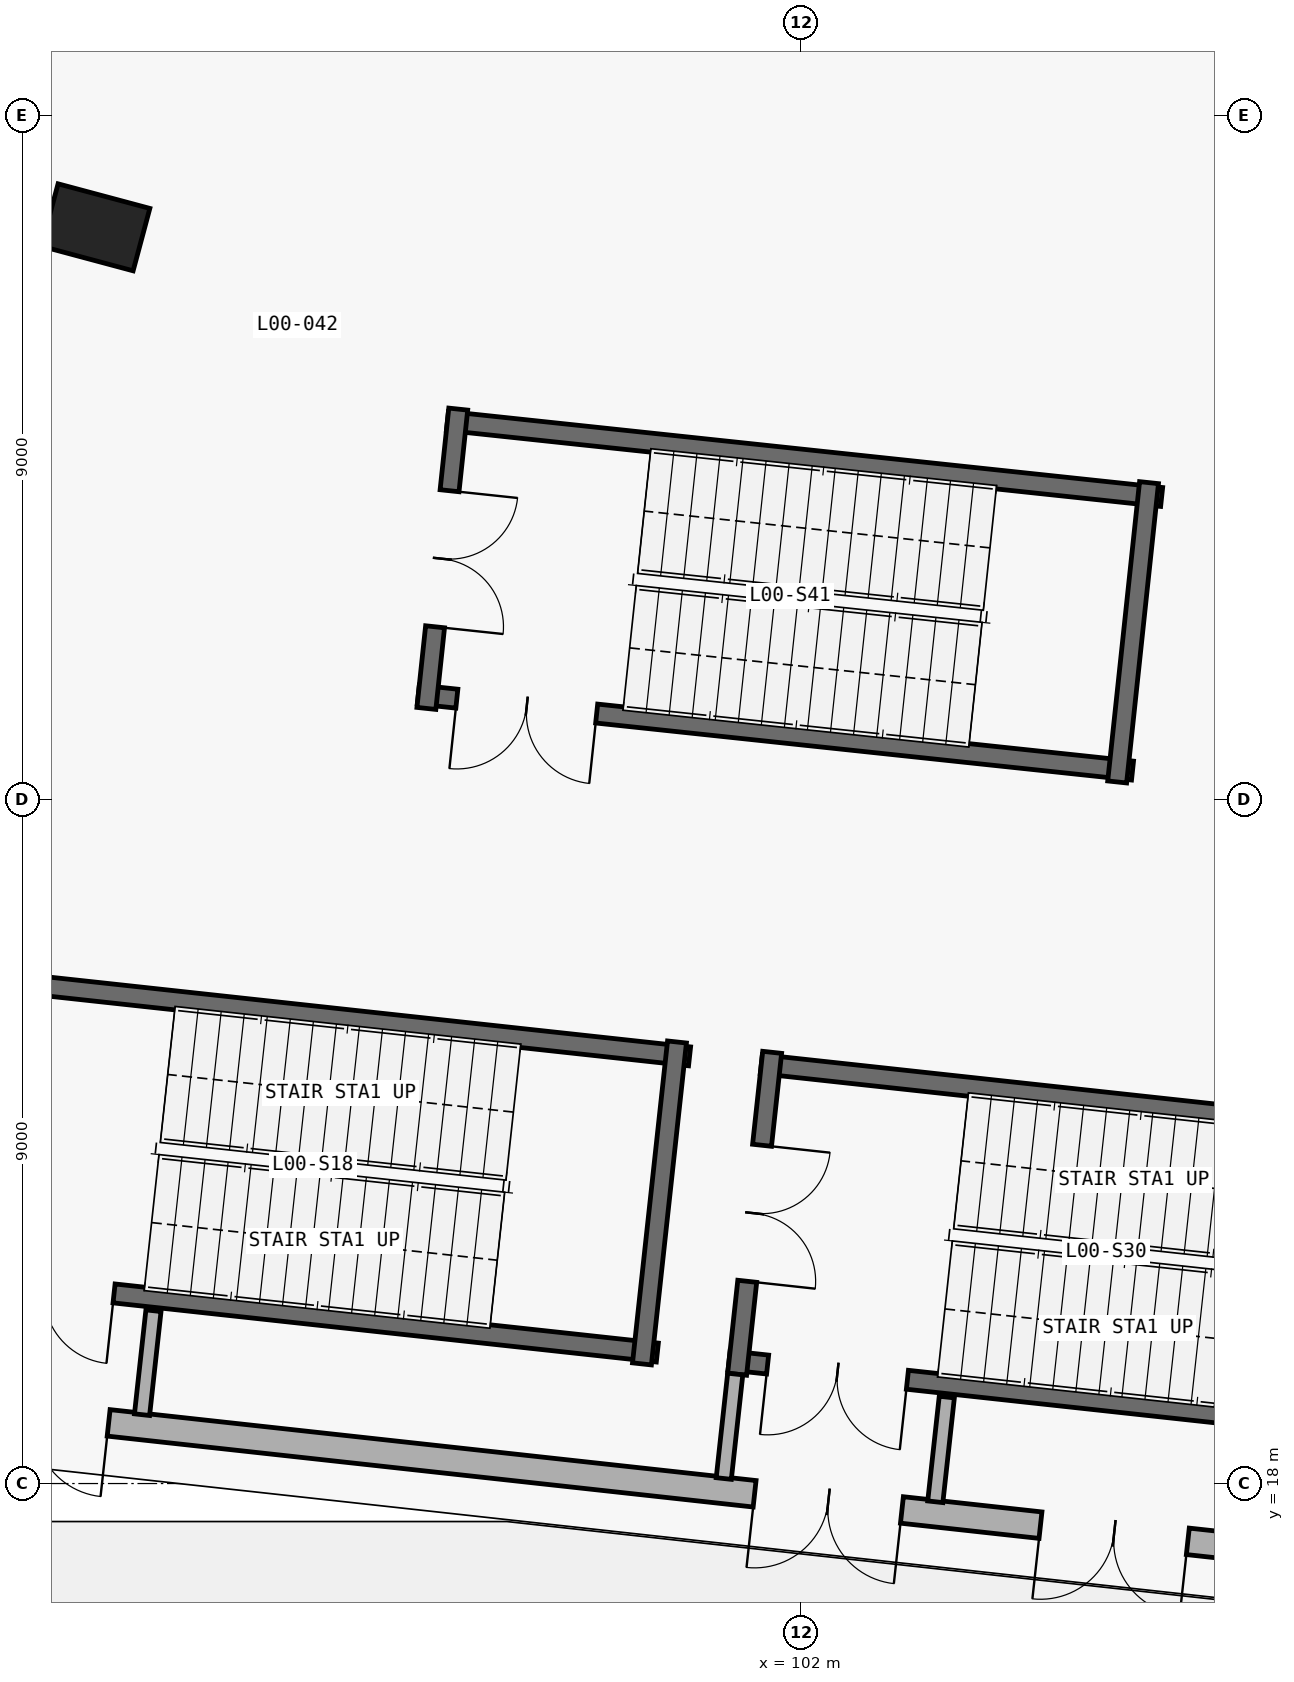
"""IFC4 building model, lengths in metres.
Left out: names, types, materials, properties, quantities, classifications, styles, units other than length and angle.
Written with IfcOpenShell. Run it as: python <this file> out.ifc"""

import sys

from ifc_helpers import new_model, si_unit, direction, frame, frame_2d, origin, origin_2d, place, context, subcontext, project, spatial, rectangle, extrude, element, fill, save


model = new_model("IFC4")
c1 = context("Model", 3, precision=1e-05, world=origin(), true_north=direction((0.0, 1.0)))
c2 = subcontext(c1, "Body", "Model", "MODEL_VIEW")
j1 = project(units=[si_unit("LENGTHUNIT", "METRE"), si_unit("PLANEANGLEUNIT", "RADIAN")], contexts=[c1])
p1 = place(None, origin())
s1 = spatial("IfcSite", under=j1, at=p1, CompositionType="ELEMENT")
p2 = place(p1, origin())
s2 = spatial("IfcBuilding", under=s1, at=p2, CompositionType="ELEMENT")
p3 = place(p2, origin())
s3 = spatial("IfcBuildingStorey", under=s2, at=p3, CompositionType="ELEMENT", Elevation=0.0)
p4 = place(p3, frame((92.718, 34.527, 0.0), z_axis=(0.0, 0.0, 1.0), x_axis=(0.258819045103, 0.965925826289, 0.0)))
e1 = element("IfcColumn", 1, at=p4, inside=s3, PredefinedType="COLUMN", context=c2, shape_type="SweptSolid", body=[
    extrude(rectangle(XDim=0.85, YDim=1.25, at=origin_2d()), origin(), (0.0, 0.0, 1.0), 5.4),
])
p5 = place(p3, frame((111.475, 16.758, 0.0), z_axis=(0.0, 0.0, 1.0), x_axis=(-0.994028735725, 0.10911861689, 0.0)))
e2 = element("IfcWall", 2, at=p5, inside=s3, PredefinedType="STANDARD", context=c2, shape_type="SweptSolid", body=[
    extrude(rectangle(XDim=22.452, YDim=0.35, at=frame_2d((11.226, 0.0))), origin(), (0.0, 0.0, 1.0), 4.165),
])
p6 = place(p5, frame((18.697, 0.0, 0.0)))
e3 = element("IfcOpeningElement", 3, at=p6, cuts=e2, PredefinedType="OPENING", context=c2, shape_type="SweptSolid", body=[
    extrude(rectangle(XDim=1.95, YDim=2.25, at=frame_2d((0.975, 1.125))), frame((0.0, 0.185, 0.0), z_axis=(0.0, -1.0, 0.0), x_axis=(1.0, 0.0, 0.0)), (0.0, 0.0, 1.0), 0.37),
])
p7 = place(p5, frame((8.197, 0.0, 0.0)))
e4 = element("IfcOpeningElement", 4, at=p7, cuts=e2, PredefinedType="OPENING", context=c2, shape_type="SweptSolid", body=[
    extrude(rectangle(XDim=1.95, YDim=2.25, at=frame_2d((0.975, 1.125))), frame((0.0, 0.185, 0.0), z_axis=(0.0, -1.0, 0.0), x_axis=(1.0, 0.0, 0.0)), (0.0, 0.0, 1.0), 0.37),
])
p8 = place(p5, frame((4.413, 0.0, 0.0)))
e5 = element("IfcOpeningElement", 5, at=p8, cuts=e2, PredefinedType="OPENING", context=c2, shape_type="SweptSolid", body=[
    extrude(rectangle(XDim=1.95, YDim=2.25, at=frame_2d((0.975, 1.125))), frame((0.0, 0.185, 0.0), z_axis=(0.0, -1.0, 0.0), x_axis=(1.0, 0.0, 0.0)), (0.0, 0.0, 1.0), 0.37),
])
p9 = place(p3, frame((100.109, 19.723, 0.0), z_axis=(0.0, 0.0, 1.0), x_axis=(-0.994127555169, 0.108214620337, 0.0)))
e6 = element("IfcWall", 6, at=p9, inside=s3, PredefinedType="SHEAR", context=c2, shape_type="SweptSolid", body=[
    extrude(rectangle(XDim=9.55, YDim=0.25, at=frame_2d((4.775, 0.0))), origin(), (0.0, 0.0, 1.0), 5.1),
])
p10 = place(p9, frame((7.19, 0.0, 0.0)))
e7 = element("IfcOpeningElement", 7, at=p10, cuts=e6, PredefinedType="OPENING", context=c2, shape_type="SweptSolid", body=[
    extrude(rectangle(XDim=1.85, YDim=2.3, at=frame_2d((0.925, 1.15))), frame((0.0, 0.135, 0.0), z_axis=(0.0, -1.0, 0.0), x_axis=(1.0, 0.0, 0.0)), (0.0, 0.0, 1.0), 0.27),
])
p11 = place(p3, frame((100.533, 23.62, 0.0), z_axis=(0.0, 0.0, 1.0), x_axis=(-0.994127555169, 0.108214620337, 0.0)))
e8 = element("IfcWall", 8, at=p11, inside=s3, PredefinedType="SHEAR", context=c2, shape_type="SweptSolid", body=[
    extrude(rectangle(XDim=9.55, YDim=0.25, at=frame_2d((4.775, 0.0))), origin(), (0.0, 0.0, 1.0), 5.1),
])
p12 = place(p3, frame((99.906, 19.574, 0.0), z_axis=(0.0, 0.0, 1.0), x_axis=(0.108198315262, 0.994129329903, 0.0)))
e9 = element("IfcWall", 9, at=p12, inside=s3, PredefinedType="SHEAR", context=c2, shape_type="SweptSolid", body=[
    extrude(rectangle(XDim=4.26, YDim=0.25, at=frame_2d((2.13, 0.0))), origin(), (0.0, 0.0, 1.0), 5.1),
])
p13 = place(p3, frame((110.547, 18.587, 0.0), z_axis=(0.0, 0.0, 1.0), x_axis=(-0.994127555169, 0.108214620337, 0.0)))
e10 = element("IfcWall", 10, at=p13, inside=s3, PredefinedType="SHEAR", context=c2, shape_type="SweptSolid", body=[
    extrude(rectangle(XDim=9.55, YDim=0.25, at=frame_2d((4.775, 0.0))), origin(), (0.0, 0.0, 1.0), 5.1),
])
p14 = place(p13, frame((7.19, 0.0, 0.0)))
e11 = element("IfcOpeningElement", 11, at=p14, cuts=e10, PredefinedType="OPENING", context=c2, shape_type="SweptSolid", body=[
    extrude(rectangle(XDim=1.85, YDim=2.3, at=frame_2d((0.925, 1.15))), frame((0.0, 0.135, 0.0), z_axis=(0.0, -1.0, 0.0), x_axis=(1.0, 0.0, 0.0)), (0.0, 0.0, 1.0), 0.27),
])
p15 = place(p3, frame((110.971, 22.484, 0.0), z_axis=(0.0, 0.0, 1.0), x_axis=(-0.994127555169, 0.108214620337, 0.0)))
e12 = element("IfcWall", 12, at=p15, inside=s3, PredefinedType="SHEAR", context=c2, shape_type="SweptSolid", body=[
    extrude(rectangle(XDim=9.55, YDim=0.25, at=frame_2d((4.775, 0.0))), origin(), (0.0, 0.0, 1.0), 5.1),
])
p16 = place(p3, frame((101.62, 23.673, 0.0), z_axis=(0.0, 0.0, 1.0), x_axis=(-0.108198315262, -0.994129329903, 0.0)))
e13 = element("IfcWall", 13, at=p16, inside=s3, PredefinedType="SHEAR", context=c2, shape_type="SweptSolid", body=[
    extrude(rectangle(XDim=4.26, YDim=0.25, at=frame_2d((2.13, 0.0))), origin(), (0.0, 0.0, 1.0), 5.1),
])
p17 = place(p16, frame((1.23, 0.0, 0.0)))
e14 = element("IfcOpeningElement", 14, at=p17, cuts=e13, PredefinedType="OPENING", context=c2, shape_type="SweptSolid", body=[
    extrude(rectangle(XDim=1.8, YDim=2.25, at=frame_2d((0.9, 1.125))), frame((0.0, 0.135, 0.0), z_axis=(0.0, -1.0, 0.0), x_axis=(1.0, 0.0, 0.0)), (0.0, 0.0, 1.0), 0.27),
])
p18 = place(p3, frame((106.361, 27.38, 0.0), z_axis=(0.0, 0.0, 1.0), x_axis=(-0.994382608826, 0.105845298736, 0.0)))
e15 = element("IfcWall", 15, at=p18, inside=s3, PredefinedType="SHEAR", context=c2, shape_type="SweptSolid", body=[
    extrude(rectangle(XDim=9.45, YDim=0.25, at=frame_2d((4.725, 0.0))), origin(), (0.0, 0.0, 1.0), 5.1),
])
p19 = place(p18, frame((7.09, 0.0, 0.0)))
e16 = element("IfcOpeningElement", 16, at=p19, cuts=e15, PredefinedType="OPENING", context=c2, shape_type="SweptSolid", body=[
    extrude(rectangle(XDim=1.85, YDim=2.3, at=frame_2d((0.925, 1.15))), frame((0.0, 0.135, 0.0), z_axis=(0.0, -1.0, 0.0), x_axis=(1.0, 0.0, 0.0)), (0.0, 0.0, 1.0), 0.27),
])
p20 = place(p3, frame((106.744, 30.979, 0.0), z_axis=(0.0, 0.0, 1.0), x_axis=(-0.994382608826, 0.105845298736, 0.0)))
e17 = element("IfcWall", 17, at=p20, inside=s3, PredefinedType="SHEAR", context=c2, shape_type="SweptSolid", body=[
    extrude(rectangle(XDim=9.45, YDim=0.25, at=frame_2d((4.725, 0.0))), origin(), (0.0, 0.0, 1.0), 5.1),
])
p21 = place(p3, frame((97.49, 32.135, 0.0), z_axis=(0.0, 0.0, 1.0), x_axis=(-0.105856095603, -0.994381459513, 0.0)))
e18 = element("IfcWall", 18, at=p21, inside=s3, PredefinedType="SHEAR", context=c2, shape_type="SweptSolid", body=[
    extrude(rectangle(XDim=3.96, YDim=0.25, at=frame_2d((1.98, 0.0))), origin(), (0.0, 0.0, 1.0), 5.1),
])
p22 = place(p21, frame((1.08, 0.0, 0.0)))
e19 = element("IfcOpeningElement", 19, at=p22, cuts=e18, PredefinedType="OPENING", context=c2, shape_type="SweptSolid", body=[
    extrude(rectangle(XDim=1.8, YDim=2.25, at=frame_2d((0.9, 1.125))), frame((0.0, 0.135, 0.0), z_axis=(0.0, -1.0, 0.0), x_axis=(1.0, 0.0, 0.0)), (0.0, 0.0, 1.0), 0.27),
])
p23 = place(p3, frame((106.159, 27.23, 0.0), z_axis=(0.0, 0.0, 1.0), x_axis=(0.105856095603, 0.994381459513, 0.0)))
e20 = element("IfcWall", 20, at=p23, inside=s3, PredefinedType="SHEAR", context=c2, shape_type="SweptSolid", body=[
    extrude(rectangle(XDim=3.96, YDim=0.25, at=frame_2d((1.98, 0.0))), origin(), (0.0, 0.0, 1.0), 5.1),
])
p24 = place(p3, frame((93.479, 20.274, 0.0), z_axis=(0.0, 0.0, 1.0), x_axis=(-0.109301909368, -0.994008597854, 0.0)))
e21 = element("IfcWall", 21, at=p24, inside=s3, PredefinedType="PARTITIONING", context=c2, shape_type="SweptSolid", body=[
    extrude(rectangle(XDim=1.376, YDim=0.2, at=frame_2d((0.688, 0.0))), origin(), (0.0, 0.0, 1.0), 4.165),
])
p25 = place(p3, frame((101.134, 19.441, 0.0), z_axis=(0.0, 0.0, 1.0), x_axis=(-0.109094546517, -0.994031377734, 0.0)))
e22 = element("IfcWall", 22, at=p25, inside=s3, PredefinedType="PARTITIONING", context=c2, shape_type="SweptSolid", body=[
    extrude(rectangle(XDim=1.383, YDim=0.2, at=frame_2d((0.691, 0.0))), origin(), (0.0, 0.0, 1.0), 4.165),
])
p26 = place(p3, frame((103.917, 19.138, 0.0), z_axis=(0.0, 0.0, 1.0), x_axis=(-0.109213425596, -0.994018323609, 0.0)))
e23 = element("IfcWall", 23, at=p26, inside=s3, PredefinedType="PARTITIONING", context=c2, shape_type="SweptSolid", body=[
    extrude(rectangle(XDim=1.386, YDim=0.2, at=frame_2d((0.693, 0.0))), origin(), (0.0, 0.0, 1.0), 4.165),
])
p27 = place(p6, origin())
e24 = element("IfcDoor", 24, at=p27, inside=s3, OperationType="DOUBLE_DOOR_SINGLE_SWING", PredefinedType="DOOR", context=c2, shape_type="SweptSolid", body=[
    extrude(rectangle(XDim=1.95, YDim=2.25, at=frame_2d((0.975, 1.125))), frame((0.0, 0.025, 0.0), z_axis=(0.0, -1.0, 0.0), x_axis=(1.0, 0.0, 0.0)), (0.0, 0.0, 1.0), 0.05),
])
fill(e3, e24)
p28 = place(p7, origin())
e25 = element("IfcDoor", 25, at=p28, inside=s3, OperationType="DOUBLE_DOOR_SINGLE_SWING", PredefinedType="DOOR", context=c2, shape_type="SweptSolid", body=[
    extrude(rectangle(XDim=1.95, YDim=2.25, at=frame_2d((0.975, 1.125))), frame((0.0, 0.025, 0.0), z_axis=(0.0, -1.0, 0.0), x_axis=(1.0, 0.0, 0.0)), (0.0, 0.0, 1.0), 0.05),
])
fill(e4, e25)
p29 = place(p8, origin())
e26 = element("IfcDoor", 26, at=p29, inside=s3, OperationType="DOUBLE_DOOR_SINGLE_SWING", PredefinedType="DOOR", context=c2, shape_type="SweptSolid", body=[
    extrude(rectangle(XDim=1.95, YDim=2.25, at=frame_2d((0.975, 1.125))), frame((0.0, 0.025, 0.0), z_axis=(0.0, -1.0, 0.0), x_axis=(1.0, 0.0, 0.0)), (0.0, 0.0, 1.0), 0.05),
])
fill(e5, e26)
p30 = place(p10, origin())
e27 = element("IfcDoor", 27, at=p30, inside=s3, OperationType="DOUBLE_DOOR_SINGLE_SWING", PredefinedType="DOOR", context=c2, shape_type="SweptSolid", body=[
    extrude(rectangle(XDim=1.85, YDim=2.3, at=frame_2d((0.925, 1.15))), frame((0.0, 0.025, 0.0), z_axis=(0.0, -1.0, 0.0), x_axis=(1.0, 0.0, 0.0)), (0.0, 0.0, 1.0), 0.05),
])
fill(e7, e27)
p31 = place(p17, origin())
e28 = element("IfcDoor", 28, at=p31, inside=s3, OperationType="DOUBLE_DOOR_SINGLE_SWING", PredefinedType="DOOR", context=c2, shape_type="SweptSolid", body=[
    extrude(rectangle(XDim=1.8, YDim=2.25, at=frame_2d((0.9, 1.125))), frame((0.0, 0.025, 0.0), z_axis=(0.0, -1.0, 0.0), x_axis=(1.0, 0.0, 0.0)), (0.0, 0.0, 1.0), 0.05),
])
fill(e14, e28)
p32 = place(p14, origin())
e29 = element("IfcDoor", 29, at=p32, inside=s3, OperationType="DOUBLE_DOOR_SINGLE_SWING", PredefinedType="DOOR", context=c2, shape_type="SweptSolid", body=[
    extrude(rectangle(XDim=1.85, YDim=2.3, at=frame_2d((0.925, 1.15))), frame((0.0, 0.025, 0.0), z_axis=(0.0, -1.0, 0.0), x_axis=(1.0, 0.0, 0.0)), (0.0, 0.0, 1.0), 0.05),
])
fill(e11, e29)
p33 = place(p22, origin())
e30 = element("IfcDoor", 30, at=p33, inside=s3, OperationType="DOUBLE_DOOR_SINGLE_SWING", PredefinedType="DOOR", context=c2, shape_type="SweptSolid", body=[
    extrude(rectangle(XDim=1.8, YDim=2.25, at=frame_2d((0.9, 1.125))), frame((0.0, 0.025, 0.0), z_axis=(0.0, -1.0, 0.0), x_axis=(1.0, 0.0, 0.0)), (0.0, 0.0, 1.0), 0.05),
])
fill(e19, e30)
p34 = place(p19, origin())
e31 = element("IfcDoor", 31, at=p34, inside=s3, OperationType="DOUBLE_DOOR_SINGLE_SWING", PredefinedType="DOOR", context=c2, shape_type="SweptSolid", body=[
    extrude(rectangle(XDim=1.85, YDim=2.3, at=frame_2d((0.925, 1.15))), frame((0.0, 0.025, 0.0), z_axis=(0.0, -1.0, 0.0), x_axis=(1.0, 0.0, 0.0)), (0.0, 0.0, 1.0), 0.05),
])
fill(e16, e31)
save(model, sys.argv[1])
